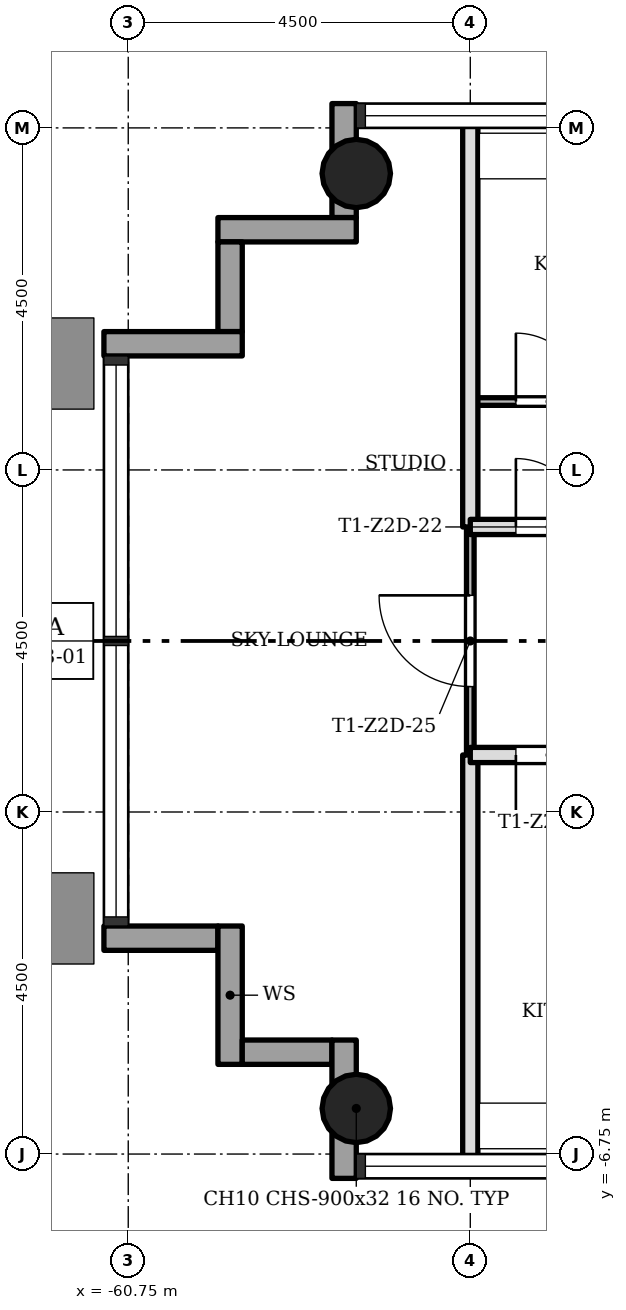
"""IFC4 building model, lengths in metres.
Left out: names, types, materials, properties, quantities, classifications, styles, units other than length and angle.
Written with IfcOpenShell. Run it as: python <this file> out.ifc"""

import sys

from ifc_helpers import new_model, si_unit, direction, frame, frame_2d, origin, origin_2d, place, context, subcontext, project, spatial, rectangle, hollow_circle, extrude, element, fill, save


model = new_model("IFC4")
c1 = context("Model", 3, precision=1e-05, world=origin(), true_north=direction((0.0, 1.0)))
c2 = subcontext(c1, "Body", "Model", "MODEL_VIEW")
j1 = project(units=[si_unit("LENGTHUNIT", "METRE"), si_unit("PLANEANGLEUNIT", "RADIAN")], contexts=[c1])
p1 = place(None, origin())
s1 = spatial("IfcSite", under=j1, at=p1, CompositionType="ELEMENT")
p2 = place(p1, origin())
s2 = spatial("IfcBuilding", under=s1, at=p2, CompositionType="ELEMENT")
p3 = place(p2, frame((0.0, 0.0, 120.8)))
s3 = spatial("IfcBuildingStorey", under=s2, at=p3, CompositionType="ELEMENT", Elevation=120.8)
for number, where, z_axis, x_axis in (
    (1, (-57.75, -6.15, 0.0), (0.0, 0.0, 1.0), (1.0, 0.0, 0.0)),
    (2, (-57.75, 6.15, 0.0), (0.0, 0.0, 1.0), (1.0, 0.0, 0.0)),
):
    element("IfcColumn", number, at=place(p3, frame(where, z_axis=z_axis, x_axis=x_axis)), inside=s3, PredefinedType="COLUMN", context=c2, shape_type="SweptSolid", body=[
        extrude(hollow_circle(Radius=0.45, WallThickness=0.032, at=origin_2d()), origin(), (0.0, 0.0, 1.0), 3.4),
    ])
p4 = place(p3, frame((-61.07, -3.91, -0.3), z_axis=(0.0, 0.0, 1.0), x_axis=(1.0, 0.0, 0.0)))
e3 = element("IfcWall", 3, at=p4, inside=s3, PredefinedType="STANDARD", context=c2, shape_type="SweptSolid", body=[
    extrude(rectangle(XDim=1.5, YDim=0.32, at=frame_2d((0.75, 0.0))), origin(), (0.0, 0.0, 1.0), 3.4),
])
p5 = place(p3, frame((-59.41, -3.75, -0.3), z_axis=(0.0, 0.0, 1.0), x_axis=(0.0, -1.0, 0.0)))
e4 = element("IfcWall", 4, at=p5, inside=s3, PredefinedType="STANDARD", context=c2, shape_type="SweptSolid", body=[
    extrude(rectangle(XDim=1.82, YDim=0.32, at=frame_2d((0.91, 0.0))), origin(), (0.0, 0.0, 1.0), 3.4),
])
p6 = place(p3, frame((-59.25, -5.41, -0.3), z_axis=(0.0, 0.0, 1.0), x_axis=(1.0, 0.0, 0.0)))
e5 = element("IfcWall", 5, at=p6, inside=s3, PredefinedType="STANDARD", context=c2, shape_type="SweptSolid", body=[
    extrude(rectangle(XDim=1.18, YDim=0.32, at=frame_2d((0.59, 0.0))), origin(), (0.0, 0.0, 1.0), 3.4),
])
p7 = place(p3, frame((-57.91, -5.25, -0.3), z_axis=(0.0, 0.0, 1.0), x_axis=(0.0, -1.0, 0.0)))
e6 = element("IfcWall", 6, at=p7, inside=s3, PredefinedType="STANDARD", context=c2, shape_type="SweptSolid", body=[
    extrude(rectangle(XDim=1.82, YDim=0.32, at=frame_2d((0.91, 0.0))), origin(), (0.0, 0.0, 1.0), 3.4),
])
p8 = place(p3, frame((-57.91, 7.07, -0.3), z_axis=(0.0, 0.0, 1.0), x_axis=(0.0, -1.0, 0.0)))
e7 = element("IfcWall", 7, at=p8, inside=s3, PredefinedType="STANDARD", context=c2, shape_type="SweptSolid", body=[
    extrude(rectangle(XDim=1.5, YDim=0.32, at=frame_2d((0.75, 0.0))), origin(), (0.0, 0.0, 1.0), 3.4),
])
p9 = place(p3, frame((-57.75, 5.41, -0.3), z_axis=(0.0, 0.0, 1.0), x_axis=(-1.0, 0.0, 0.0)))
e8 = element("IfcWall", 8, at=p9, inside=s3, PredefinedType="STANDARD", context=c2, shape_type="SweptSolid", body=[
    extrude(rectangle(XDim=1.82, YDim=0.32, at=frame_2d((0.91, 0.0))), origin(), (0.0, 0.0, 1.0), 3.4),
])
p10 = place(p3, frame((-59.41, 5.25, -0.3), z_axis=(0.0, 0.0, 1.0), x_axis=(0.0, -1.0, 0.0)))
e9 = element("IfcWall", 9, at=p10, inside=s3, PredefinedType="STANDARD", context=c2, shape_type="SweptSolid", body=[
    extrude(rectangle(XDim=1.18, YDim=0.32, at=frame_2d((0.59, 0.0))), origin(), (0.0, 0.0, 1.0), 3.4),
])
p11 = place(p3, frame((-59.25, 3.91, -0.3), z_axis=(0.0, 0.0, 1.0), x_axis=(-1.0, 0.0, 0.0)))
e10 = element("IfcWall", 10, at=p11, inside=s3, PredefinedType="STANDARD", context=c2, shape_type="SweptSolid", body=[
    extrude(rectangle(XDim=1.82, YDim=0.32, at=frame_2d((0.91, 0.0))), origin(), (0.0, 0.0, 1.0), 3.4),
])
p12 = place(p3, frame((-56.25, -1.5, 0.0), z_axis=(0.0, 0.0, 1.0), x_axis=(0.0, 1.0, 0.0)))
e11 = element("IfcWall", 11, at=p12, inside=s3, PredefinedType="PARTITIONING", context=c2, shape_type="SweptSolid", body=[
    extrude(rectangle(XDim=3.0, YDim=0.1, at=frame_2d((1.5, 0.0))), origin(), (0.0, 0.0, 1.0), 3.0),
])
p13 = place(p12, frame((0.9, 0.0, 0.0)))
e12 = element("IfcOpeningElement", 12, at=p13, cuts=e11, PredefinedType="OPENING", context=c2, shape_type="SweptSolid", body=[
    extrude(rectangle(XDim=1.2, YDim=2.1, at=frame_2d((0.6, 1.05))), frame((0.0, 0.06, 0.0), z_axis=(0.0, -1.0, 0.0), x_axis=(1.0, 0.0, 0.0)), (0.0, 0.0, 1.0), 0.12),
])
for number, where, z_axis, x_axis in (
    (13, (-56.25, -6.85, 0.0), (0.0, 0.0, 1.0), (0.0, 1.0, 0.0)),
    (14, (-56.25, 1.5, 0.0), (0.0, 0.0, 1.0), (0.0, 1.0, 0.0)),
):
    element("IfcWall", number, at=place(p3, frame(where, z_axis=z_axis, x_axis=x_axis)), inside=s3, PredefinedType="SOLIDWALL", context=c2, shape_type="SweptSolid", body=[
        extrude(rectangle(XDim=5.35, YDim=0.2, at=frame_2d((2.675, 0.0))), origin(), (0.0, 0.0, 1.0), 3.0),
    ])
p14 = place(p3, frame((-56.25, -1.5, 0.0), z_axis=(0.0, 0.0, 1.0), x_axis=(1.0, 0.0, 0.0)))
e15 = element("IfcWall", 15, at=p14, inside=s3, PredefinedType="SOLIDWALL", context=c2, shape_type="SweptSolid", body=[
    extrude(rectangle(XDim=4.5, YDim=0.2, at=frame_2d((2.25, 0.0))), origin(), (0.0, 0.0, 1.0), 3.0),
])
p15 = place(p14, frame((0.6, 0.0, 0.0)))
e16 = element("IfcOpeningElement", 16, at=p15, cuts=e15, PredefinedType="OPENING", context=c2, shape_type="SweptSolid", body=[
    extrude(rectangle(XDim=0.9, YDim=2.1, at=frame_2d((0.45, 1.05))), frame((0.0, 0.11, 0.0), z_axis=(0.0, -1.0, 0.0), x_axis=(1.0, 0.0, 0.0)), (0.0, 0.0, 1.0), 0.22),
])
p16 = place(p3, frame((-56.25, 1.5, 0.0), z_axis=(0.0, 0.0, 1.0), x_axis=(1.0, 0.0, 0.0)))
e17 = element("IfcWall", 17, at=p16, inside=s3, PredefinedType="SOLIDWALL", context=c2, shape_type="SweptSolid", body=[
    extrude(rectangle(XDim=4.5, YDim=0.2, at=frame_2d((2.25, 0.0))), origin(), (0.0, 0.0, 1.0), 3.0),
])
p17 = place(p16, frame((0.6, 0.0, 0.0)))
e18 = element("IfcOpeningElement", 18, at=p17, cuts=e17, PredefinedType="OPENING", context=c2, shape_type="SweptSolid", body=[
    extrude(rectangle(XDim=0.9, YDim=2.1, at=frame_2d((0.45, 1.05))), frame((0.0, 0.11, 0.0), z_axis=(0.0, -1.0, 0.0), x_axis=(1.0, 0.0, 0.0)), (0.0, 0.0, 1.0), 0.22),
])
p18 = place(p3, frame((-56.25, 3.15, 0.0), z_axis=(0.0, 0.0, 1.0), x_axis=(1.0, 0.0, 0.0)))
e19 = element("IfcWall", 19, at=p18, inside=s3, PredefinedType="PARTITIONING", context=c2, shape_type="SweptSolid", body=[
    extrude(rectangle(XDim=4.5, YDim=0.1, at=frame_2d((2.25, 0.0))), origin(), (0.0, 0.0, 1.0), 3.0),
])
p19 = place(p18, frame((0.6, 0.0, 0.0)))
e20 = element("IfcOpeningElement", 20, at=p19, cuts=e19, PredefinedType="OPENING", context=c2, shape_type="SweptSolid", body=[
    extrude(rectangle(XDim=0.9, YDim=2.1, at=frame_2d((0.45, 1.05))), frame((0.0, 0.06, 0.0), z_axis=(0.0, -1.0, 0.0), x_axis=(1.0, 0.0, 0.0)), (0.0, 0.0, 1.0), 0.12),
])
p20 = place(p15, origin())
e21 = element("IfcDoor", 21, at=p20, inside=s3, OperationType="SINGLE_SWING_LEFT", PredefinedType="DOOR", context=c2, shape_type="SweptSolid", body=[
    extrude(rectangle(XDim=0.9, YDim=2.1, at=frame_2d((0.45, 1.05))), frame((0.0, 0.025, 0.0), z_axis=(0.0, -1.0, 0.0), x_axis=(1.0, 0.0, 0.0)), (0.0, 0.0, 1.0), 0.05),
])
fill(e16, e21)
p21 = place(p17, origin())
e22 = element("IfcDoor", 22, at=p21, inside=s3, OperationType="SINGLE_SWING_RIGHT", PredefinedType="DOOR", context=c2, shape_type="SweptSolid", body=[
    extrude(rectangle(XDim=0.9, YDim=2.1, at=frame_2d((0.45, 1.05))), frame((0.0, 0.025, 0.0), z_axis=(0.0, -1.0, 0.0), x_axis=(1.0, 0.0, 0.0)), (0.0, 0.0, 1.0), 0.05),
])
fill(e18, e22)
p22 = place(p19, origin())
e23 = element("IfcDoor", 23, at=p22, inside=s3, OperationType="SINGLE_SWING_RIGHT", PredefinedType="DOOR", context=c2, shape_type="SweptSolid", body=[
    extrude(rectangle(XDim=0.9, YDim=2.1, at=frame_2d((0.45, 1.05))), frame((0.0, 0.025, 0.0), z_axis=(0.0, -1.0, 0.0), x_axis=(1.0, 0.0, 0.0)), (0.0, 0.0, 1.0), 0.05),
])
fill(e20, e23)
p23 = place(p13, origin())
e24 = element("IfcDoor", 24, at=p23, inside=s3, OperationType="SINGLE_SWING_LEFT", PredefinedType="DOOR", context=c2, shape_type="SweptSolid", body=[
    extrude(rectangle(XDim=1.2, YDim=2.1, at=frame_2d((0.6, 1.05))), frame((0.0, 0.025, 0.0), z_axis=(0.0, -1.0, 0.0), x_axis=(1.0, 0.0, 0.0)), (0.0, 0.0, 1.0), 0.05),
])
fill(e12, e24)
save(model, sys.argv[1])
